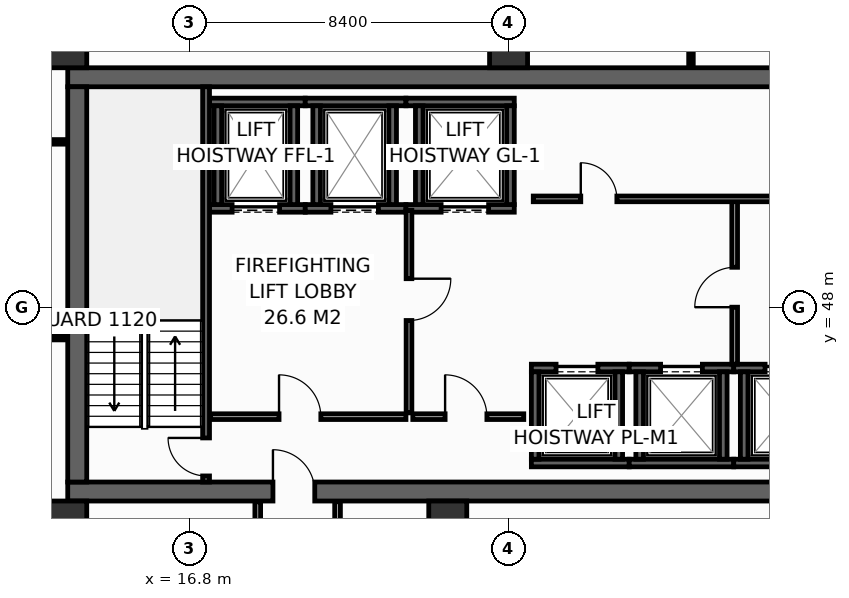
"""IFC4 building model, lengths in metres.
Left out: names, types, materials, properties, quantities, classifications, styles, units other than length and angle.
Written with IfcOpenShell. Run it as: python <this file> out.ifc"""

import sys

from ifc_helpers import new_model, si_unit, direction, frame, frame_2d, origin, origin_2d, place, context, subcontext, project, spatial, rectangle, hollow_rectangle, extrude, element, fill, save


model = new_model("IFC4")
c1 = context("Model", 3, precision=1e-05, world=origin(), true_north=direction((0.0, 1.0)))
c2 = subcontext(c1, "Body", "Model", "MODEL_VIEW")
j1 = project(units=[si_unit("LENGTHUNIT", "METRE"), si_unit("PLANEANGLEUNIT", "RADIAN")], contexts=[c1])
p1 = place(None, origin())
s1 = spatial("IfcSite", under=j1, at=p1, CompositionType="ELEMENT")
p2 = place(p1, origin())
s2 = spatial("IfcBuilding", under=s1, at=p2, CompositionType="ELEMENT")
p3 = place(p2, frame((0.0, 0.0, 171.4)))
s3 = spatial("IfcBuildingStorey", under=s2, at=p3, CompositionType="ELEMENT", Elevation=171.4)
p4 = place(p3, frame((13.6, 43.15, 0.0), z_axis=(0.0, 0.0, 1.0), x_axis=(1.0, 0.0, 0.0)))
e1 = element("IfcWall", 1, at=p4, inside=s3, PredefinedType="SHEAR", context=c2, shape_type="SweptSolid", body=[
    extrude(rectangle(XDim=32.7, YDim=0.5, at=frame_2d((16.35, 0.0))), origin(), (0.0, 0.0, 1.0), 3.55),
])
p5 = place(p4, frame((5.4, 0.0, 0.0)))
e2 = element("IfcOpeningElement", 2, at=p5, cuts=e1, PredefinedType="OPENING", context=c2, shape_type="SweptSolid", body=[
    extrude(rectangle(XDim=1.1, YDim=2.15, at=frame_2d((0.55, 1.075))), frame((0.0, 0.26, 0.0), z_axis=(0.0, -1.0, 0.0), x_axis=(1.0, 0.0, 0.0)), (0.0, 0.0, 1.0), 0.52),
])
p6 = place(p4, frame((25.6, 0.0, 0.0)))
e3 = element("IfcOpeningElement", 3, at=p6, cuts=e1, PredefinedType="OPENING", context=c2, shape_type="SweptSolid", body=[
    extrude(rectangle(XDim=1.1, YDim=2.15, at=frame_2d((0.55, 1.075))), frame((0.0, 0.26, 0.0), z_axis=(0.0, -1.0, 0.0), x_axis=(1.0, 0.0, 0.0)), (0.0, 0.0, 1.0), 0.52),
])
p7 = place(p3, frame((13.6, 54.05, 0.0), z_axis=(0.0, 0.0, 1.0), x_axis=(1.0, 0.0, 0.0)))
e4 = element("IfcWall", 4, at=p7, inside=s3, PredefinedType="SHEAR", context=c2, shape_type="SweptSolid", body=[
    extrude(rectangle(XDim=32.7, YDim=0.5, at=frame_2d((16.35, 0.0))), origin(), (0.0, 0.0, 1.0), 3.55),
])
p8 = place(p3, frame((13.85, 43.4, 0.0), z_axis=(0.0, 0.0, 1.0), x_axis=(0.0, 1.0, 0.0)))
e5 = element("IfcWall", 5, at=p8, inside=s3, PredefinedType="SHEAR", context=c2, shape_type="SweptSolid", body=[
    extrude(rectangle(XDim=10.4, YDim=0.5, at=frame_2d((5.2, 0.0))), origin(), (0.0, 0.0, 1.0), 3.55),
])
for number, where, z_axis, x_axis in (
    (6, (13.6, 54.8, 0.0), (0.0, 0.0, 1.0), (1.0, 0.0, 0.0)),
    (7, (25.2, 54.8, 0.0), (0.0, 0.0, 1.0), (1.0, 0.0, 0.0)),
    (8, (13.6, 42.4, 0.0), (0.0, 0.0, 1.0), (1.0, 0.0, 0.0)),
    (9, (23.6, 42.4, 0.0), (0.0, 0.0, 1.0), (1.0, 0.0, 0.0)),
):
    element("IfcColumn", number, at=place(p3, frame(where, z_axis=z_axis, x_axis=x_axis)), inside=s3, PredefinedType="COLUMN", context=c2, shape_type="SweptSolid", body=[
        extrude(hollow_rectangle(XDim=1.0, YDim=1.0, WallThickness=0.045, at=origin_2d()), origin(), (0.0, 0.0, 1.0), 3.8),
    ])
p9 = place(p3, frame((17.33, 50.6, 0.0), z_axis=(0.0, 0.0, 1.0), x_axis=(1.0, 0.0, 0.0)))
e10 = element("IfcWall", 10, at=p9, inside=s3, PredefinedType="SHEAR", context=c2, shape_type="SweptSolid", body=[
    extrude(rectangle(XDim=2.52, YDim=0.2, at=frame_2d((1.26, 0.0))), origin(), (0.0, 0.0, 1.0), 3.55),
])
p10 = place(p9, frame((0.595, 0.0, 0.0)))
e11 = element("IfcOpeningElement", 11, at=p10, cuts=e10, PredefinedType="OPENING", context=c2, shape_type="SweptSolid", body=[
    extrude(rectangle(XDim=1.25, YDim=2.3, at=frame_2d((0.625, 1.15))), frame((0.0, 0.11, 0.0), z_axis=(0.0, -1.0, 0.0), x_axis=(1.0, 0.0, 0.0)), (0.0, 0.0, 1.0), 0.22),
])
p11 = place(p3, frame((17.33, 53.4, 0.0), z_axis=(0.0, 0.0, 1.0), x_axis=(1.0, 0.0, 0.0)))
e12 = element("IfcWall", 12, at=p11, inside=s3, PredefinedType="SHEAR", context=c2, shape_type="SweptSolid", body=[
    extrude(rectangle(XDim=2.52, YDim=0.2, at=frame_2d((1.26, 0.0))), origin(), (0.0, 0.0, 1.0), 3.55),
])
for number, where, z_axis, x_axis in (
    (13, (17.55, 50.7, 0.0), (0.0, 0.0, 1.0), (0.0, 1.0, 0.0)),
    (14, (19.55, 50.7, 0.0), (0.0, 0.0, 1.0), (0.0, 1.0, 0.0)),
):
    element("IfcWall", number, at=place(p3, frame(where, z_axis=z_axis, x_axis=x_axis)), inside=s3, PredefinedType="SHEAR", context=c2, shape_type="SweptSolid", body=[
        extrude(rectangle(XDim=2.6, YDim=0.2, at=frame_2d((1.3, 0.0))), origin(), (0.0, 0.0, 1.0), 3.55),
    ])
p12 = place(p3, frame((19.85, 50.6, 0.0), z_axis=(0.0, 0.0, 1.0), x_axis=(1.0, 0.0, 0.0)))
e15 = element("IfcWall", 15, at=p12, inside=s3, PredefinedType="SHEAR", context=c2, shape_type="SweptSolid", body=[
    extrude(rectangle(XDim=2.65, YDim=0.2, at=frame_2d((1.325, 0.0))), origin(), (0.0, 0.0, 1.0), 3.55),
])
p13 = place(p12, frame((0.675, 0.0, 0.0)))
e16 = element("IfcOpeningElement", 16, at=p13, cuts=e15, PredefinedType="OPENING", context=c2, shape_type="SweptSolid", body=[
    extrude(rectangle(XDim=1.25, YDim=2.3, at=frame_2d((0.625, 1.15))), frame((0.0, 0.11, 0.0), z_axis=(0.0, -1.0, 0.0), x_axis=(1.0, 0.0, 0.0)), (0.0, 0.0, 1.0), 0.22),
])
p14 = place(p3, frame((19.85, 53.4, 0.0), z_axis=(0.0, 0.0, 1.0), x_axis=(1.0, 0.0, 0.0)))
e17 = element("IfcWall", 17, at=p14, inside=s3, PredefinedType="SHEAR", context=c2, shape_type="SweptSolid", body=[
    extrude(rectangle(XDim=2.65, YDim=0.2, at=frame_2d((1.325, 0.0))), origin(), (0.0, 0.0, 1.0), 3.55),
])
for number, where, z_axis, x_axis in (
    (18, (20.15, 50.7, 0.0), (0.0, 0.0, 1.0), (0.0, 1.0, 0.0)),
    (19, (22.15, 50.7, 0.0), (0.0, 0.0, 1.0), (0.0, 1.0, 0.0)),
):
    element("IfcWall", number, at=place(p3, frame(where, z_axis=z_axis, x_axis=x_axis)), inside=s3, PredefinedType="SHEAR", context=c2, shape_type="SweptSolid", body=[
        extrude(rectangle(XDim=2.6, YDim=0.2, at=frame_2d((1.3, 0.0))), origin(), (0.0, 0.0, 1.0), 3.55),
    ])
p15 = place(p3, frame((22.5, 50.6, 0.0), z_axis=(0.0, 0.0, 1.0), x_axis=(1.0, 0.0, 0.0)))
e20 = element("IfcWall", 20, at=p15, inside=s3, PredefinedType="SHEAR", context=c2, shape_type="SweptSolid", body=[
    extrude(rectangle(XDim=2.85, YDim=0.2, at=frame_2d((1.425, 0.0))), origin(), (0.0, 0.0, 1.0), 3.55),
])
p16 = place(p15, frame((0.925, 0.0, 0.0)))
e21 = element("IfcOpeningElement", 21, at=p16, cuts=e20, PredefinedType="OPENING", context=c2, shape_type="SweptSolid", body=[
    extrude(rectangle(XDim=1.25, YDim=2.3, at=frame_2d((0.625, 1.15))), frame((0.0, 0.11, 0.0), z_axis=(0.0, -1.0, 0.0), x_axis=(1.0, 0.0, 0.0)), (0.0, 0.0, 1.0), 0.22),
])
p17 = place(p3, frame((22.5, 53.4, 0.0), z_axis=(0.0, 0.0, 1.0), x_axis=(1.0, 0.0, 0.0)))
e22 = element("IfcWall", 22, at=p17, inside=s3, PredefinedType="SHEAR", context=c2, shape_type="SweptSolid", body=[
    extrude(rectangle(XDim=2.85, YDim=0.2, at=frame_2d((1.425, 0.0))), origin(), (0.0, 0.0, 1.0), 3.55),
])
for number, where, z_axis, x_axis in (
    (23, (22.85, 50.7, 0.0), (0.0, 0.0, 1.0), (0.0, 1.0, 0.0)),
    (24, (25.25, 50.7, 0.0), (0.0, 0.0, 1.0), (0.0, 1.0, 0.0)),
):
    element("IfcWall", number, at=place(p3, frame(where, z_axis=z_axis, x_axis=x_axis)), inside=s3, PredefinedType="SHEAR", context=c2, shape_type="SweptSolid", body=[
        extrude(rectangle(XDim=2.6, YDim=0.2, at=frame_2d((1.3, 0.0))), origin(), (0.0, 0.0, 1.0), 3.55),
    ])
p18 = place(p3, frame((25.8, 43.9, 0.0), z_axis=(0.0, 0.0, 1.0), x_axis=(1.0, 0.0, 0.0)))
e25 = element("IfcWall", 25, at=p18, inside=s3, PredefinedType="SHEAR", context=c2, shape_type="SweptSolid", body=[
    extrude(rectangle(XDim=2.575, YDim=0.2, at=frame_2d((1.288, 0.0))), origin(), (0.0, 0.0, 1.0), 3.55),
])
p19 = place(p3, frame((25.8, 46.4, 0.0), z_axis=(0.0, 0.0, 1.0), x_axis=(1.0, 0.0, 0.0)))
e26 = element("IfcWall", 26, at=p19, inside=s3, PredefinedType="SHEAR", context=c2, shape_type="SweptSolid", body=[
    extrude(rectangle(XDim=2.575, YDim=0.2, at=frame_2d((1.288, 0.0))), origin(), (0.0, 0.0, 1.0), 3.55),
])
p20 = place(p19, frame((0.65, 0.0, 0.0)))
e27 = element("IfcOpeningElement", 27, at=p20, cuts=e26, PredefinedType="OPENING", context=c2, shape_type="SweptSolid", body=[
    extrude(rectangle(XDim=1.1, YDim=2.2, at=frame_2d((0.55, 1.1))), frame((0.0, 0.11, 0.0), z_axis=(0.0, -1.0, 0.0), x_axis=(1.0, 0.0, 0.0)), (0.0, 0.0, 1.0), 0.22),
])
for number, where, z_axis, x_axis in (
    (28, (25.9, 44.0, 0.0), (0.0, 0.0, 1.0), (0.0, 1.0, 0.0)),
    (29, (28.1, 44.0, 0.0), (0.0, 0.0, 1.0), (0.0, 1.0, 0.0)),
):
    element("IfcWall", number, at=place(p3, frame(where, z_axis=z_axis, x_axis=x_axis)), inside=s3, PredefinedType="SHEAR", context=c2, shape_type="SweptSolid", body=[
        extrude(rectangle(XDim=2.3, YDim=0.2, at=frame_2d((1.15, 0.0))), origin(), (0.0, 0.0, 1.0), 3.55),
    ])
p21 = place(p3, frame((28.375, 43.9, 0.0), z_axis=(0.0, 0.0, 1.0), x_axis=(1.0, 0.0, 0.0)))
e30 = element("IfcWall", 30, at=p21, inside=s3, PredefinedType="SHEAR", context=c2, shape_type="SweptSolid", body=[
    extrude(rectangle(XDim=2.75, YDim=0.2, at=frame_2d((1.375, 0.0))), origin(), (0.0, 0.0, 1.0), 3.55),
])
p22 = place(p3, frame((28.375, 46.4, 0.0), z_axis=(0.0, 0.0, 1.0), x_axis=(1.0, 0.0, 0.0)))
e31 = element("IfcWall", 31, at=p22, inside=s3, PredefinedType="SHEAR", context=c2, shape_type="SweptSolid", body=[
    extrude(rectangle(XDim=2.75, YDim=0.2, at=frame_2d((1.375, 0.0))), origin(), (0.0, 0.0, 1.0), 3.55),
])
p23 = place(p22, frame((0.825, 0.0, 0.0)))
e32 = element("IfcOpeningElement", 32, at=p23, cuts=e31, PredefinedType="OPENING", context=c2, shape_type="SweptSolid", body=[
    extrude(rectangle(XDim=1.1, YDim=2.2, at=frame_2d((0.55, 1.1))), frame((0.0, 0.11, 0.0), z_axis=(0.0, -1.0, 0.0), x_axis=(1.0, 0.0, 0.0)), (0.0, 0.0, 1.0), 0.22),
])
for number, where, z_axis, x_axis in (
    (33, (28.65, 44.0, 0.0), (0.0, 0.0, 1.0), (0.0, 1.0, 0.0)),
    (34, (30.85, 44.0, 0.0), (0.0, 0.0, 1.0), (0.0, 1.0, 0.0)),
):
    element("IfcWall", number, at=place(p3, frame(where, z_axis=z_axis, x_axis=x_axis)), inside=s3, PredefinedType="SHEAR", context=c2, shape_type="SweptSolid", body=[
        extrude(rectangle(XDim=2.3, YDim=0.2, at=frame_2d((1.15, 0.0))), origin(), (0.0, 0.0, 1.0), 3.55),
    ])
p24 = place(p3, frame((31.125, 43.9, 0.0), z_axis=(0.0, 0.0, 1.0), x_axis=(1.0, 0.0, 0.0)))
e35 = element("IfcWall", 35, at=p24, inside=s3, PredefinedType="SHEAR", context=c2, shape_type="SweptSolid", body=[
    extrude(rectangle(XDim=2.575, YDim=0.2, at=frame_2d((1.288, 0.0))), origin(), (0.0, 0.0, 1.0), 3.55),
])
p25 = place(p3, frame((31.125, 46.4, 0.0), z_axis=(0.0, 0.0, 1.0), x_axis=(1.0, 0.0, 0.0)))
e36 = element("IfcWall", 36, at=p25, inside=s3, PredefinedType="SHEAR", context=c2, shape_type="SweptSolid", body=[
    extrude(rectangle(XDim=2.575, YDim=0.2, at=frame_2d((1.288, 0.0))), origin(), (0.0, 0.0, 1.0), 3.55),
])
p26 = place(p25, frame((0.825, 0.0, 0.0)))
e37 = element("IfcOpeningElement", 37, at=p26, cuts=e36, PredefinedType="OPENING", context=c2, shape_type="SweptSolid", body=[
    extrude(rectangle(XDim=1.1, YDim=2.2, at=frame_2d((0.55, 1.1))), frame((0.0, 0.11, 0.0), z_axis=(0.0, -1.0, 0.0), x_axis=(1.0, 0.0, 0.0)), (0.0, 0.0, 1.0), 0.22),
])
p27 = place(p3, frame((31.4, 44.0, 0.0), z_axis=(0.0, 0.0, 1.0), x_axis=(0.0, 1.0, 0.0)))
e38 = element("IfcWall", 38, at=p27, inside=s3, PredefinedType="SHEAR", context=c2, shape_type="SweptSolid", body=[
    extrude(rectangle(XDim=2.3, YDim=0.2, at=frame_2d((1.15, 0.0))), origin(), (0.0, 0.0, 1.0), 3.55),
])
p28 = place(p3, frame((17.24, 43.4, 0.0), z_axis=(0.0, 0.0, 1.0), x_axis=(0.0, 1.0, 0.0)))
e39 = element("IfcWall", 39, at=p28, inside=s3, PredefinedType="SHEAR", context=c2, shape_type="SweptSolid", body=[
    extrude(rectangle(XDim=10.4, YDim=0.18, at=frame_2d((5.2, 0.0))), origin(), (0.0, 0.0, 1.0), 3.55),
])
p29 = place(p28, frame((0.16, 0.0, 0.0)))
e40 = element("IfcOpeningElement", 40, at=p29, cuts=e39, PredefinedType="OPENING", context=c2, shape_type="SweptSolid", body=[
    extrude(rectangle(XDim=1.0, YDim=2.15, at=frame_2d((0.5, 1.075))), frame((0.0, 0.1, 0.0), z_axis=(0.0, -1.0, 0.0), x_axis=(1.0, 0.0, 0.0)), (0.0, 0.0, 1.0), 0.2),
])
p30 = place(p3, frame((17.36, 45.12, 0.0), z_axis=(0.0, 0.0, 1.0), x_axis=(1.0, 0.0, 0.0)))
e41 = element("IfcWall", 41, at=p30, inside=s3, PredefinedType="PARTITIONING", context=c2, shape_type="SweptSolid", body=[
    extrude(rectangle(XDim=5.14, YDim=0.15, at=frame_2d((2.57, 0.0))), origin(), (0.0, 0.0, 1.0), 3.55),
])
p31 = place(p30, frame((1.8, 0.0, 0.0)))
e42 = element("IfcOpeningElement", 42, at=p31, cuts=e41, PredefinedType="OPENING", context=c2, shape_type="SweptSolid", body=[
    extrude(rectangle(XDim=1.1, YDim=2.15, at=frame_2d((0.55, 1.075))), frame((0.0, 0.085, 0.0), z_axis=(0.0, -1.0, 0.0), x_axis=(1.0, 0.0, 0.0)), (0.0, 0.0, 1.0), 0.17),
])
p32 = place(p3, frame((22.58, 50.55, 0.0), z_axis=(0.0, 0.0, 1.0), x_axis=(0.0, -1.0, 0.0)))
e43 = element("IfcWall", 43, at=p32, inside=s3, PredefinedType="PARTITIONING", context=c2, shape_type="SweptSolid", body=[
    extrude(rectangle(XDim=5.33, YDim=0.15, at=frame_2d((2.665, 0.0))), origin(), (0.0, 0.0, 1.0), 3.55),
])
p33 = place(p32, frame((1.8, 0.0, 0.0)))
e44 = element("IfcOpeningElement", 44, at=p33, cuts=e43, PredefinedType="OPENING", context=c2, shape_type="SweptSolid", body=[
    extrude(rectangle(XDim=1.1, YDim=2.15, at=frame_2d((0.55, 1.075))), frame((0.0, 0.085, 0.0), z_axis=(0.0, -1.0, 0.0), x_axis=(1.0, 0.0, 0.0)), (0.0, 0.0, 1.0), 0.17),
])
p34 = place(p3, frame((22.68, 45.12, 0.0), z_axis=(0.0, 0.0, 1.0), x_axis=(1.0, 0.0, 0.0)))
e45 = element("IfcWall", 45, at=p34, inside=s3, PredefinedType="PARTITIONING", context=c2, shape_type="SweptSolid", body=[
    extrude(rectangle(XDim=2.92, YDim=0.15, at=frame_2d((1.46, 0.0))), origin(), (0.0, 0.0, 1.0), 3.55),
])
p35 = place(p34, frame((0.85, 0.0, 0.0)))
e46 = element("IfcOpeningElement", 46, at=p35, cuts=e45, PredefinedType="OPENING", context=c2, shape_type="SweptSolid", body=[
    extrude(rectangle(XDim=1.1, YDim=2.15, at=frame_2d((0.55, 1.075))), frame((0.0, 0.085, 0.0), z_axis=(0.0, -1.0, 0.0), x_axis=(1.0, 0.0, 0.0)), (0.0, 0.0, 1.0), 0.17),
])
p36 = place(p3, frame((31.15, 46.5, 0.0), z_axis=(0.0, 0.0, 1.0), x_axis=(0.0, 1.0, 0.0)))
e47 = element("IfcWall", 47, at=p36, inside=s3, PredefinedType="PARTITIONING", context=c2, shape_type="SweptSolid", body=[
    extrude(rectangle(XDim=4.35, YDim=0.15, at=frame_2d((2.175, 0.0))), origin(), (0.0, 0.0, 1.0), 3.55),
])
p37 = place(p36, frame((1.5, 0.0, 0.0)))
e48 = element("IfcOpeningElement", 48, at=p37, cuts=e47, PredefinedType="OPENING", context=c2, shape_type="SweptSolid", body=[
    extrude(rectangle(XDim=1.05, YDim=2.15, at=frame_2d((0.525, 1.075))), frame((0.0, 0.085, 0.0), z_axis=(0.0, -1.0, 0.0), x_axis=(1.0, 0.0, 0.0)), (0.0, 0.0, 1.0), 0.17),
])
p38 = place(p3, frame((25.85, 50.85, 0.0), z_axis=(0.0, 0.0, 1.0), x_axis=(1.0, 0.0, 0.0)))
e49 = element("IfcWall", 49, at=p38, inside=s3, PredefinedType="PARTITIONING", context=c2, shape_type="SweptSolid", body=[
    extrude(rectangle(XDim=7.65, YDim=0.15, at=frame_2d((3.825, 0.0))), origin(), (0.0, 0.0, 1.0), 3.55),
])
p39 = place(p38, frame((1.25, 0.0, 0.0)))
e50 = element("IfcOpeningElement", 50, at=p39, cuts=e49, PredefinedType="OPENING", context=c2, shape_type="SweptSolid", body=[
    extrude(rectangle(XDim=0.95, YDim=2.15, at=frame_2d((0.475, 1.075))), frame((0.0, 0.085, 0.0), z_axis=(0.0, -1.0, 0.0), x_axis=(1.0, 0.0, 0.0)), (0.0, 0.0, 1.0), 0.17),
])
p40 = place(p3, frame((11.55, 52.35, 0.0), z_axis=(0.0, 0.0, 1.0), x_axis=(1.0, 0.0, 0.0)))
e51 = element("IfcWall", 51, at=p40, inside=s3, PredefinedType="PARTITIONING", context=c2, shape_type="SweptSolid", body=[
    extrude(rectangle(XDim=2.03, YDim=0.12, at=frame_2d((1.015, 0.0))), origin(), (0.0, 0.0, 1.0), 3.55),
])
p41 = place(p3, frame((30.0, 54.32, 0.0), z_axis=(0.0, 0.0, 1.0), x_axis=(0.0, 1.0, 0.0)))
e52 = element("IfcWall", 52, at=p41, inside=s3, PredefinedType="PARTITIONING", context=c2, shape_type="SweptSolid", body=[
    extrude(rectangle(XDim=1.675, YDim=0.12, at=frame_2d((0.837, 0.0))), origin(), (0.0, 0.0, 1.0), 2.935),
])
p42 = place(p3, frame((11.55, 47.2, 0.0), z_axis=(0.0, 0.0, 1.0), x_axis=(1.0, 0.0, 0.0)))
e53 = element("IfcWall", 53, at=p42, inside=s3, PredefinedType="PARTITIONING", context=c2, shape_type="SweptSolid", body=[
    extrude(rectangle(XDim=2.03, YDim=0.12, at=frame_2d((1.015, 0.0))), origin(), (0.0, 0.0, 1.0), 3.55),
])
p43 = place(p3, frame((13.8, 40.83, 0.0), z_axis=(0.0, 0.0, 1.0), x_axis=(0.0, 1.0, 0.0)))
e54 = element("IfcWall", 54, at=p43, inside=s3, PredefinedType="PARTITIONING", context=c2, shape_type="SweptSolid", body=[
    extrude(rectangle(XDim=2.05, YDim=0.15, at=frame_2d((1.025, 0.0))), origin(), (0.0, 0.0, 1.0), 3.55),
])
for number, where, z_axis, x_axis in (
    (55, (18.6, 40.75, 0.0), (0.0, 0.0, 1.0), (0.0, 1.0, 0.0)),
    (56, (20.7, 40.75, 0.0), (0.0, 0.0, 1.0), (0.0, 1.0, 0.0)),
):
    element("IfcWall", number, at=place(p3, frame(where, z_axis=z_axis, x_axis=x_axis)), inside=s3, PredefinedType="PARTITIONING", context=c2, shape_type="SweptSolid", body=[
        extrude(rectangle(XDim=2.13, YDim=0.15, at=frame_2d((1.065, 0.0))), origin(), (0.0, 0.0, 1.0), 3.55),
    ])
p44 = place(p10, origin())
e57 = element("IfcDoor", 57, at=p44, inside=s3, OperationType="SLIDING_TO_LEFT", PredefinedType="DOOR", context=c2, shape_type="SweptSolid", body=[
    extrude(rectangle(XDim=1.25, YDim=2.3, at=frame_2d((0.625, 1.15))), frame((0.0, 0.025, 0.0), z_axis=(0.0, -1.0, 0.0), x_axis=(1.0, 0.0, 0.0)), (0.0, 0.0, 1.0), 0.05),
])
fill(e11, e57)
p45 = place(p13, origin())
e58 = element("IfcDoor", 58, at=p45, inside=s3, OperationType="SLIDING_TO_LEFT", PredefinedType="DOOR", context=c2, shape_type="SweptSolid", body=[
    extrude(rectangle(XDim=1.25, YDim=2.3, at=frame_2d((0.625, 1.15))), frame((0.0, 0.025, 0.0), z_axis=(0.0, -1.0, 0.0), x_axis=(1.0, 0.0, 0.0)), (0.0, 0.0, 1.0), 0.05),
])
fill(e16, e58)
p46 = place(p16, origin())
e59 = element("IfcDoor", 59, at=p46, inside=s3, OperationType="SLIDING_TO_LEFT", PredefinedType="DOOR", context=c2, shape_type="SweptSolid", body=[
    extrude(rectangle(XDim=1.25, YDim=2.3, at=frame_2d((0.625, 1.15))), frame((0.0, 0.025, 0.0), z_axis=(0.0, -1.0, 0.0), x_axis=(1.0, 0.0, 0.0)), (0.0, 0.0, 1.0), 0.05),
])
fill(e21, e59)
p47 = place(p20, origin())
e60 = element("IfcDoor", 60, at=p47, inside=s3, OperationType="SLIDING_TO_LEFT", PredefinedType="DOOR", context=c2, shape_type="SweptSolid", body=[
    extrude(rectangle(XDim=1.1, YDim=2.2, at=frame_2d((0.55, 1.1))), frame((0.0, 0.025, 0.0), z_axis=(0.0, -1.0, 0.0), x_axis=(1.0, 0.0, 0.0)), (0.0, 0.0, 1.0), 0.05),
])
fill(e27, e60)
p48 = place(p23, origin())
e61 = element("IfcDoor", 61, at=p48, inside=s3, OperationType="SLIDING_TO_LEFT", PredefinedType="DOOR", context=c2, shape_type="SweptSolid", body=[
    extrude(rectangle(XDim=1.1, YDim=2.2, at=frame_2d((0.55, 1.1))), frame((0.0, 0.025, 0.0), z_axis=(0.0, -1.0, 0.0), x_axis=(1.0, 0.0, 0.0)), (0.0, 0.0, 1.0), 0.05),
])
fill(e32, e61)
p49 = place(p26, origin())
e62 = element("IfcDoor", 62, at=p49, inside=s3, OperationType="SLIDING_TO_LEFT", PredefinedType="DOOR", context=c2, shape_type="SweptSolid", body=[
    extrude(rectangle(XDim=1.1, YDim=2.2, at=frame_2d((0.55, 1.1))), frame((0.0, 0.025, 0.0), z_axis=(0.0, -1.0, 0.0), x_axis=(1.0, 0.0, 0.0)), (0.0, 0.0, 1.0), 0.05),
])
fill(e37, e62)
p50 = place(p29, origin())
e63 = element("IfcDoor", 63, at=p50, inside=s3, OperationType="SINGLE_SWING_RIGHT", PredefinedType="DOOR", context=c2, shape_type="SweptSolid", body=[
    extrude(rectangle(XDim=1.0, YDim=2.15, at=frame_2d((0.5, 1.075))), frame((0.0, 0.025, 0.0), z_axis=(0.0, -1.0, 0.0), x_axis=(1.0, 0.0, 0.0)), (0.0, 0.0, 1.0), 0.05),
])
fill(e40, e63)
p51 = place(p31, origin())
e64 = element("IfcDoor", 64, at=p51, inside=s3, OperationType="SINGLE_SWING_LEFT", PredefinedType="DOOR", context=c2, shape_type="SweptSolid", body=[
    extrude(rectangle(XDim=1.1, YDim=2.15, at=frame_2d((0.55, 1.075))), frame((0.0, 0.025, 0.0), z_axis=(0.0, -1.0, 0.0), x_axis=(1.0, 0.0, 0.0)), (0.0, 0.0, 1.0), 0.05),
])
fill(e42, e64)
p52 = place(p33, origin())
e65 = element("IfcDoor", 65, at=p52, inside=s3, OperationType="SINGLE_SWING_LEFT", PredefinedType="DOOR", context=c2, shape_type="SweptSolid", body=[
    extrude(rectangle(XDim=1.1, YDim=2.15, at=frame_2d((0.55, 1.075))), frame((0.0, 0.025, 0.0), z_axis=(0.0, -1.0, 0.0), x_axis=(1.0, 0.0, 0.0)), (0.0, 0.0, 1.0), 0.05),
])
fill(e44, e65)
p53 = place(p35, origin())
e66 = element("IfcDoor", 66, at=p53, inside=s3, OperationType="SINGLE_SWING_LEFT", PredefinedType="DOOR", context=c2, shape_type="SweptSolid", body=[
    extrude(rectangle(XDim=1.1, YDim=2.15, at=frame_2d((0.55, 1.075))), frame((0.0, 0.025, 0.0), z_axis=(0.0, -1.0, 0.0), x_axis=(1.0, 0.0, 0.0)), (0.0, 0.0, 1.0), 0.05),
])
fill(e46, e66)
p54 = place(p5, origin())
e67 = element("IfcDoor", 67, at=p54, inside=s3, OperationType="SINGLE_SWING_LEFT", PredefinedType="DOOR", context=c2, shape_type="SweptSolid", body=[
    extrude(rectangle(XDim=1.1, YDim=2.15, at=frame_2d((0.55, 1.075))), frame((0.0, 0.025, 0.0), z_axis=(0.0, -1.0, 0.0), x_axis=(1.0, 0.0, 0.0)), (0.0, 0.0, 1.0), 0.05),
])
fill(e2, e67)
p55 = place(p37, origin())
e68 = element("IfcDoor", 68, at=p55, inside=s3, OperationType="SINGLE_SWING_LEFT", PredefinedType="DOOR", context=c2, shape_type="SweptSolid", body=[
    extrude(rectangle(XDim=1.05, YDim=2.15, at=frame_2d((0.525, 1.075))), frame((0.0, 0.025, 0.0), z_axis=(0.0, -1.0, 0.0), x_axis=(1.0, 0.0, 0.0)), (0.0, 0.0, 1.0), 0.05),
])
fill(e48, e68)
p56 = place(p39, origin())
e69 = element("IfcDoor", 69, at=p56, inside=s3, OperationType="SINGLE_SWING_LEFT", PredefinedType="DOOR", context=c2, shape_type="SweptSolid", body=[
    extrude(rectangle(XDim=0.95, YDim=2.15, at=frame_2d((0.475, 1.075))), frame((0.0, 0.025, 0.0), z_axis=(0.0, -1.0, 0.0), x_axis=(1.0, 0.0, 0.0)), (0.0, 0.0, 1.0), 0.05),
])
fill(e50, e69)
save(model, sys.argv[1])
